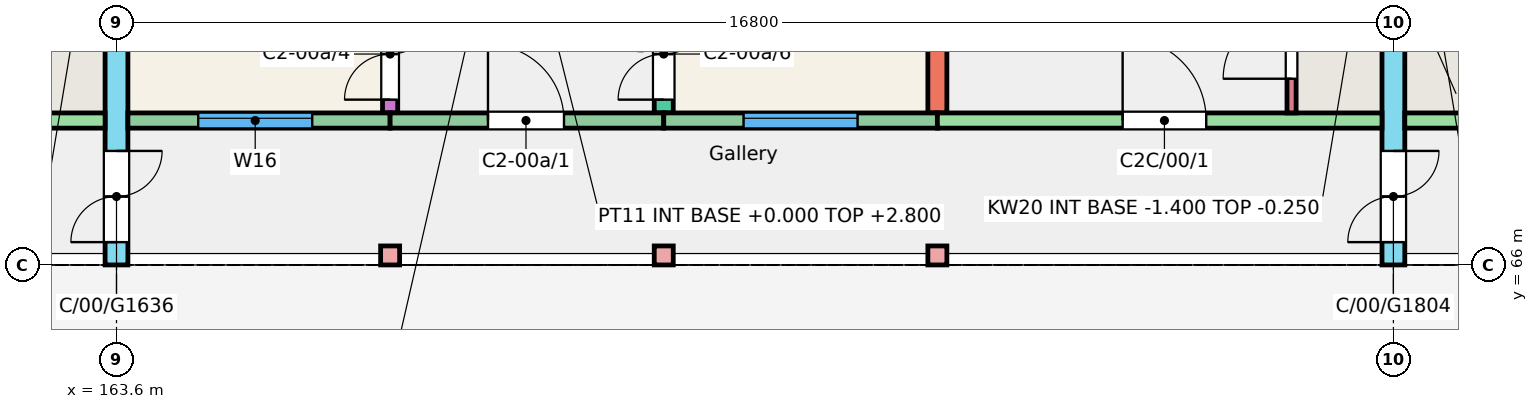
"""IFC4 building model, lengths in metres.
Left out: names, types, materials, properties, quantities, classifications, styles, units other than length and angle.
Written with IfcOpenShell. Run it as: python <this file> out.ifc"""

import sys

from ifc_helpers import new_model, si_unit, direction, frame, frame_2d, origin, origin_2d, place, context, subcontext, project, spatial, rectangle, extrude, element, fill, save


model = new_model("IFC4")
c1 = context("Model", 3, precision=1e-05, world=origin(), true_north=direction((0.0, 1.0)))
c2 = subcontext(c1, "Body", "Model", "MODEL_VIEW")
j1 = project(units=[si_unit("LENGTHUNIT", "METRE"), si_unit("PLANEANGLEUNIT", "RADIAN")], contexts=[c1])
p1 = place(None, origin())
s1 = spatial("IfcSite", under=j1, at=p1, CompositionType="ELEMENT")
p2 = place(p1, origin())
s2 = spatial("IfcBuilding", under=s1, at=p2, CompositionType="ELEMENT")
p3 = place(p2, origin())
s3 = spatial("IfcBuildingStorey", under=s2, at=p3, CompositionType="ELEMENT", Elevation=0.0)
p4 = place(p3, frame((163.6, 66.0, -0.25), z_axis=(0.0, 0.0, 1.0), x_axis=(0.0, 1.0, 0.0)))
e1 = element("IfcWall", 1, at=p4, inside=s3, PredefinedType="SHEAR", context=c2, shape_type="SweptSolid", body=[
    extrude(rectangle(XDim=11.0, YDim=0.3, at=frame_2d((5.5, 0.0))), origin(), (0.0, 0.0, 1.0), 3.25),
])
p5 = place(p4, frame((0.3, 0.0, 0.25)))
e2 = element("IfcOpeningElement", 2, at=p5, cuts=e1, PredefinedType="OPENING", context=c2, shape_type="SweptSolid", body=[
    extrude(rectangle(XDim=1.2, YDim=2.1, at=frame_2d((0.6, 1.05))), frame((0.0, 0.16, 0.0), z_axis=(0.0, -1.0, 0.0), x_axis=(1.0, 0.0, 0.0)), (0.0, 0.0, 1.0), 0.32),
])
p6 = place(p3, frame((167.2, 68.0, -0.25), z_axis=(0.0, 0.0, 1.0), x_axis=(0.0, 1.0, 0.0)))
e3 = element("IfcWall", 3, at=p6, inside=s3, PredefinedType="SHEAR", context=c2, shape_type="SweptSolid", body=[
    extrude(rectangle(XDim=9.0, YDim=0.2, at=frame_2d((4.5, 0.0))), origin(), (0.0, 0.0, 1.0), 3.25),
])
p7 = place(p6, frame((0.175, 0.0, 0.25)))
e4 = element("IfcOpeningElement", 4, at=p7, cuts=e3, PredefinedType="OPENING", context=c2, shape_type="SweptSolid", body=[
    extrude(rectangle(XDim=1.2, YDim=2.1, at=frame_2d((0.6, 1.05))), frame((0.0, 0.11, 0.0), z_axis=(0.0, -1.0, 0.0), x_axis=(1.0, 0.0, 0.0)), (0.0, 0.0, 1.0), 0.22),
])
p8 = place(p6, frame((6.4, 0.0, 0.25)))
e5 = element("IfcOpeningElement", 5, at=p8, cuts=e3, PredefinedType="OPENING", context=c2, shape_type="SweptSolid", body=[
    extrude(rectangle(XDim=1.2, YDim=2.1, at=frame_2d((0.6, 1.05))), frame((0.0, 0.11, 0.0), z_axis=(0.0, -1.0, 0.0), x_axis=(1.0, 0.0, 0.0)), (0.0, 0.0, 1.0), 0.22),
])
p9 = place(p3, frame((170.8, 68.0, -0.25), z_axis=(0.0, 0.0, 1.0), x_axis=(0.0, 1.0, 0.0)))
e6 = element("IfcWall", 6, at=p9, inside=s3, PredefinedType="SHEAR", context=c2, shape_type="SweptSolid", body=[
    extrude(rectangle(XDim=9.0, YDim=0.25, at=frame_2d((4.5, 0.0))), origin(), (0.0, 0.0, 1.0), 3.25),
])
p10 = place(p9, frame((0.175, 0.0, 0.25)))
e7 = element("IfcOpeningElement", 7, at=p10, cuts=e6, PredefinedType="OPENING", context=c2, shape_type="SweptSolid", body=[
    extrude(rectangle(XDim=1.2, YDim=2.1, at=frame_2d((0.6, 1.05))), frame((0.0, 0.135, 0.0), z_axis=(0.0, -1.0, 0.0), x_axis=(1.0, 0.0, 0.0)), (0.0, 0.0, 1.0), 0.27),
])
p11 = place(p9, frame((6.4, 0.0, 0.25)))
e8 = element("IfcOpeningElement", 8, at=p11, cuts=e6, PredefinedType="OPENING", context=c2, shape_type="SweptSolid", body=[
    extrude(rectangle(XDim=1.2, YDim=2.1, at=frame_2d((0.6, 1.05))), frame((0.0, 0.135, 0.0), z_axis=(0.0, -1.0, 0.0), x_axis=(1.0, 0.0, 0.0)), (0.0, 0.0, 1.0), 0.27),
])
p12 = place(p3, frame((174.4, 68.0, -0.25), z_axis=(0.0, 0.0, 1.0), x_axis=(0.0, 1.0, 0.0)))
e9 = element("IfcWall", 9, at=p12, inside=s3, PredefinedType="SHEAR", context=c2, shape_type="SweptSolid", body=[
    extrude(rectangle(XDim=9.0, YDim=0.25, at=frame_2d((4.5, 0.0))), origin(), (0.0, 0.0, 1.0), 3.25),
])
p13 = place(p3, frame((180.4, 66.0, -0.25), z_axis=(0.0, 0.0, 1.0), x_axis=(0.0, 1.0, 0.0)))
e10 = element("IfcWall", 10, at=p13, inside=s3, PredefinedType="SHEAR", context=c2, shape_type="SweptSolid", body=[
    extrude(rectangle(XDim=11.0, YDim=0.3, at=frame_2d((5.5, 0.0))), origin(), (0.0, 0.0, 1.0), 3.25),
])
p14 = place(p13, frame((0.3, 0.0, 0.25)))
e11 = element("IfcOpeningElement", 11, at=p14, cuts=e10, PredefinedType="OPENING", context=c2, shape_type="SweptSolid", body=[
    extrude(rectangle(XDim=1.2, YDim=2.1, at=frame_2d((0.6, 1.05))), frame((0.0, 0.16, 0.0), z_axis=(0.0, -1.0, 0.0), x_axis=(1.0, 0.0, 0.0)), (0.0, 0.0, 1.0), 0.32),
])
p15 = place(p3, frame((157.6, 67.9, -0.25), z_axis=(0.0, 0.0, 1.0), x_axis=(1.0, 0.0, 0.0)))
e12 = element("IfcWall", 12, at=p15, inside=s3, PredefinedType="SHEAR", context=c2, shape_type="SweptSolid", body=[
    extrude(rectangle(XDim=5.85, YDim=0.2, at=frame_2d((2.925, 0.0))), origin(), (0.0, 0.0, 1.0), 3.25),
])
p16 = place(p15, frame((2.438, 0.0, 0.25)))
e13 = element("IfcOpeningElement", 13, at=p16, cuts=e12, PredefinedType="OPENING", context=c2, shape_type="SweptSolid", body=[
    extrude(rectangle(XDim=1.1, YDim=2.1, at=frame_2d((0.55, 1.05))), frame((0.0, 0.11, 0.0), z_axis=(0.0, -1.0, 0.0), x_axis=(1.0, 0.0, 0.0)), (0.0, 0.0, 1.0), 0.22),
])
p17 = place(p3, frame((163.75, 67.9, -0.25), z_axis=(0.0, 0.0, 1.0), x_axis=(1.0, 0.0, 0.0)))
e14 = element("IfcWall", 14, at=p17, inside=s3, PredefinedType="SOLIDWALL", context=c2, shape_type="SweptSolid", body=[
    extrude(rectangle(XDim=3.45, YDim=0.2, at=frame_2d((1.725, 0.0))), origin(), (0.0, 0.0, 1.0), 3.25),
])
p18 = place(p17, frame((0.925, 0.0, 1.15)))
e15 = element("IfcOpeningElement", 15, at=p18, cuts=e14, PredefinedType="OPENING", context=c2, shape_type="SweptSolid", body=[
    extrude(rectangle(XDim=1.5, YDim=1.5, at=frame_2d((0.75, 0.75))), frame((0.0, 0.11, 0.0), z_axis=(0.0, -1.0, 0.0), x_axis=(1.0, 0.0, 0.0)), (0.0, 0.0, 1.0), 0.22),
])
p19 = place(p3, frame((167.2, 67.9, -0.25), z_axis=(0.0, 0.0, 1.0), x_axis=(1.0, 0.0, 0.0)))
e16 = element("IfcWall", 16, at=p19, inside=s3, PredefinedType="SOLIDWALL", context=c2, shape_type="SweptSolid", body=[
    extrude(rectangle(XDim=3.6, YDim=0.2, at=frame_2d((1.8, 0.0))), origin(), (0.0, 0.0, 1.0), 3.25),
])
p20 = place(p19, frame((1.288, 0.0, 0.25)))
e17 = element("IfcOpeningElement", 17, at=p20, cuts=e16, PredefinedType="OPENING", context=c2, shape_type="SweptSolid", body=[
    extrude(rectangle(XDim=1.0, YDim=2.1, at=frame_2d((0.5, 1.05))), frame((0.0, 0.11, 0.0), z_axis=(0.0, -1.0, 0.0), x_axis=(1.0, 0.0, 0.0)), (0.0, 0.0, 1.0), 0.22),
])
p21 = place(p3, frame((170.8, 67.9, -0.25), z_axis=(0.0, 0.0, 1.0), x_axis=(1.0, 0.0, 0.0)))
e18 = element("IfcWall", 18, at=p21, inside=s3, PredefinedType="SOLIDWALL", context=c2, shape_type="SweptSolid", body=[
    extrude(rectangle(XDim=3.6, YDim=0.2, at=frame_2d((1.8, 0.0))), origin(), (0.0, 0.0, 1.0), 3.25),
])
p22 = place(p21, frame((1.05, 0.0, 1.15)))
e19 = element("IfcOpeningElement", 19, at=p22, cuts=e18, PredefinedType="OPENING", context=c2, shape_type="SweptSolid", body=[
    extrude(rectangle(XDim=1.5, YDim=1.5, at=frame_2d((0.75, 0.75))), frame((0.0, 0.11, 0.0), z_axis=(0.0, -1.0, 0.0), x_axis=(1.0, 0.0, 0.0)), (0.0, 0.0, 1.0), 0.22),
])
p23 = place(p3, frame((174.4, 67.9, -0.25), z_axis=(0.0, 0.0, 1.0), x_axis=(1.0, 0.0, 0.0)))
e20 = element("IfcWall", 20, at=p23, inside=s3, PredefinedType="SHEAR", context=c2, shape_type="SweptSolid", body=[
    extrude(rectangle(XDim=5.85, YDim=0.2, at=frame_2d((2.925, 0.0))), origin(), (0.0, 0.0, 1.0), 3.25),
])
p24 = place(p23, frame((2.438, 0.0, 0.25)))
e21 = element("IfcOpeningElement", 21, at=p24, cuts=e20, PredefinedType="OPENING", context=c2, shape_type="SweptSolid", body=[
    extrude(rectangle(XDim=1.1, YDim=2.1, at=frame_2d((0.55, 1.05))), frame((0.0, 0.11, 0.0), z_axis=(0.0, -1.0, 0.0), x_axis=(1.0, 0.0, 0.0)), (0.0, 0.0, 1.0), 0.22),
])
p25 = place(p3, frame((179.06, 68.0, -0.25), z_axis=(0.0, 0.0, 1.0), x_axis=(0.0, 1.0, 0.0)))
e22 = element("IfcWall", 22, at=p25, inside=s3, PredefinedType="SHEAR", context=c2, shape_type="SweptSolid", body=[
    extrude(rectangle(XDim=1.72, YDim=0.12, at=frame_2d((0.86, 0.0))), origin(), (0.0, 0.0, 1.0), 3.25),
])
p26 = place(p25, frame((0.45, 0.0, 0.25)))
e23 = element("IfcOpeningElement", 23, at=p26, cuts=e22, PredefinedType="OPENING", context=c2, shape_type="SweptSolid", body=[
    extrude(rectangle(XDim=0.9, YDim=2.1, at=frame_2d((0.45, 1.05))), frame((0.0, 0.07, 0.0), z_axis=(0.0, -1.0, 0.0), x_axis=(1.0, 0.0, 0.0)), (0.0, 0.0, 1.0), 0.14),
])
p27 = place(p3, frame((180.55, 67.9, -0.25), z_axis=(0.0, 0.0, 1.0), x_axis=(1.0, 0.0, 0.0)))
e24 = element("IfcWall", 24, at=p27, inside=s3, PredefinedType="SHEAR", context=c2, shape_type="SweptSolid", body=[
    extrude(rectangle(XDim=5.85, YDim=0.2, at=frame_2d((2.925, 0.0))), origin(), (0.0, 0.0, 1.0), 3.25),
])
p28 = place(p27, frame((2.312, 0.0, 0.25)))
e25 = element("IfcOpeningElement", 25, at=p28, cuts=e24, PredefinedType="OPENING", context=c2, shape_type="SweptSolid", body=[
    extrude(rectangle(XDim=1.1, YDim=2.1, at=frame_2d((0.55, 1.05))), frame((0.0, 0.11, 0.0), z_axis=(0.0, -1.0, 0.0), x_axis=(1.0, 0.0, 0.0)), (0.0, 0.0, 1.0), 0.22),
])
for number, where, z_axis, x_axis in (
    (26, (167.2, 66.125, -0.25), (0.0, 0.0, 1.0), (1.0, 0.0, 0.0)),
    (27, (170.8, 66.125, -0.25), (0.0, 0.0, 1.0), (1.0, 0.0, 0.0)),
    (28, (174.4, 66.125, -0.25), (0.0, 0.0, 1.0), (1.0, 0.0, 0.0)),
):
    element("IfcColumn", number, at=place(p3, frame(where, z_axis=z_axis, x_axis=x_axis)), inside=s3, PredefinedType="COLUMN", context=c2, shape_type="SweptSolid", body=[
        extrude(rectangle(XDim=0.25, YDim=0.25, at=origin_2d()), origin(), (0.0, 0.0, 1.0), 3.25),
    ])
p29 = place(p18, origin())
e29 = element("IfcWindow", 29, at=p29, inside=s3, PartitioningType="SINGLE_PANEL", PredefinedType="WINDOW", context=c2, shape_type="SweptSolid", body=[
    extrude(rectangle(XDim=1.5, YDim=1.5, at=frame_2d((0.75, 0.75))), frame((0.0, 0.06, 0.0), z_axis=(0.0, -1.0, 0.0), x_axis=(1.0, 0.0, 0.0)), (0.0, 0.0, 1.0), 0.06),
])
fill(e15, e29)
p30 = place(p22, origin())
e30 = element("IfcWindow", 30, at=p30, inside=s3, PartitioningType="SINGLE_PANEL", PredefinedType="WINDOW", context=c2, shape_type="SweptSolid", body=[
    extrude(rectangle(XDim=1.5, YDim=1.5, at=frame_2d((0.75, 0.75))), frame((0.0, 0.06, 0.0), z_axis=(0.0, -1.0, 0.0), x_axis=(1.0, 0.0, 0.0)), (0.0, 0.0, 1.0), 0.06),
])
fill(e19, e30)
p31 = place(p20, origin())
e31 = element("IfcDoor", 31, at=p31, inside=s3, OperationType="SINGLE_SWING_LEFT", PredefinedType="DOOR", context=c2, shape_type="SweptSolid", body=[
    extrude(rectangle(XDim=1.0, YDim=2.1, at=frame_2d((0.5, 1.05))), frame((0.0, 0.025, 0.0), z_axis=(0.0, -1.0, 0.0), x_axis=(1.0, 0.0, 0.0)), (0.0, 0.0, 1.0), 0.05),
])
fill(e17, e31)
p32 = place(p7, origin())
e32 = element("IfcDoor", 32, at=p32, inside=s3, OperationType="DOUBLE_DOOR_SINGLE_SWING", PredefinedType="DOOR", context=c2, shape_type="SweptSolid", body=[
    extrude(rectangle(XDim=1.2, YDim=2.1, at=frame_2d((0.6, 1.05))), frame((0.0, 0.025, 0.0), z_axis=(0.0, -1.0, 0.0), x_axis=(1.0, 0.0, 0.0)), (0.0, 0.0, 1.0), 0.05),
])
fill(e4, e32)
p33 = place(p10, origin())
e33 = element("IfcDoor", 33, at=p33, inside=s3, OperationType="DOUBLE_DOOR_SINGLE_SWING", PredefinedType="DOOR", context=c2, shape_type="SweptSolid", body=[
    extrude(rectangle(XDim=1.2, YDim=2.1, at=frame_2d((0.6, 1.05))), frame((0.0, 0.025, 0.0), z_axis=(0.0, -1.0, 0.0), x_axis=(1.0, 0.0, 0.0)), (0.0, 0.0, 1.0), 0.05),
])
fill(e7, e33)
p34 = place(p24, origin())
e34 = element("IfcDoor", 34, at=p34, inside=s3, OperationType="SINGLE_SWING_LEFT", PredefinedType="DOOR", context=c2, shape_type="SweptSolid", body=[
    extrude(rectangle(XDim=1.1, YDim=2.1, at=frame_2d((0.55, 1.05))), frame((0.0, 0.025, 0.0), z_axis=(0.0, -1.0, 0.0), x_axis=(1.0, 0.0, 0.0)), (0.0, 0.0, 1.0), 0.05),
])
fill(e21, e34)
p35 = place(p26, origin())
e35 = element("IfcDoor", 35, at=p35, inside=s3, OperationType="SINGLE_SWING_LEFT", PredefinedType="DOOR", context=c2, shape_type="SweptSolid", body=[
    extrude(rectangle(XDim=0.9, YDim=2.1, at=frame_2d((0.45, 1.05))), frame((0.0, 0.025, 0.0), z_axis=(0.0, -1.0, 0.0), x_axis=(1.0, 0.0, 0.0)), (0.0, 0.0, 1.0), 0.05),
])
fill(e23, e35)
p36 = place(p5, origin())
e36 = element("IfcDoor", 36, at=p36, inside=s3, OperationType="DOUBLE_DOOR_SINGLE_SWING", PredefinedType="DOOR", context=c2, shape_type="SweptSolid", body=[
    extrude(rectangle(XDim=1.2, YDim=2.1, at=frame_2d((0.6, 1.05))), frame((0.0, 0.025, 0.0), z_axis=(0.0, -1.0, 0.0), x_axis=(1.0, 0.0, 0.0)), (0.0, 0.0, 1.0), 0.05),
])
fill(e2, e36)
p37 = place(p14, origin())
e37 = element("IfcDoor", 37, at=p37, inside=s3, OperationType="DOUBLE_DOOR_SINGLE_SWING", PredefinedType="DOOR", context=c2, shape_type="SweptSolid", body=[
    extrude(rectangle(XDim=1.2, YDim=2.1, at=frame_2d((0.6, 1.05))), frame((0.0, 0.025, 0.0), z_axis=(0.0, -1.0, 0.0), x_axis=(1.0, 0.0, 0.0)), (0.0, 0.0, 1.0), 0.05),
])
fill(e11, e37)
save(model, sys.argv[1])
